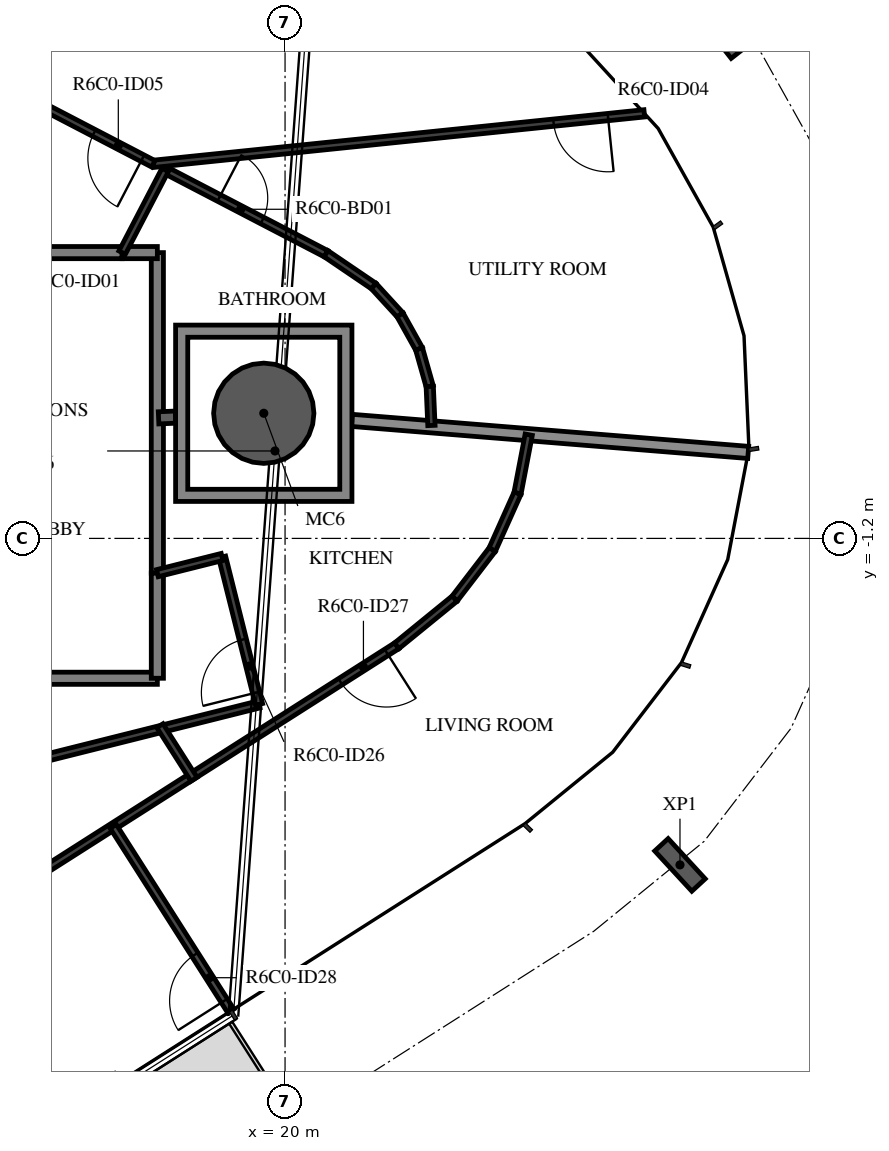
"""IFC4 building model, lengths in metres.
Left out: names, types, materials, properties, quantities, classifications, styles, units other than length and angle.
Written with IfcOpenShell. Run it as: python <this file> out.ifc"""

import sys

from ifc_helpers import new_model, si_unit, direction, frame, frame_2d, origin, origin_2d, place, context, subcontext, project, spatial, polyline, rectangle, hollow_circle, i_section, outline, extrude, element, fill, save


model = new_model("IFC4")
c1 = context("Model", 3, precision=1e-05, world=origin(), true_north=direction((0.0, 1.0)))
c2 = subcontext(c1, "Body", "Model", "MODEL_VIEW")
j1 = project(units=[si_unit("LENGTHUNIT", "METRE"), si_unit("PLANEANGLEUNIT", "RADIAN")], contexts=[c1])
p1 = place(None, origin())
s1 = spatial("IfcSite", under=j1, at=p1, CompositionType="ELEMENT")
p2 = place(p1, origin())
s2 = spatial("IfcBuilding", under=s1, at=p2, CompositionType="ELEMENT")
p3 = place(p2, frame((0.0, 0.0, 247.7)))
s3 = spatial("IfcBuildingStorey", under=s2, at=p3, CompositionType="ELEMENT", Elevation=247.7)
p4 = place(p3, frame((19.65, 0.858, -0.38), z_axis=(0.0, 0.0, 1.0), x_axis=(1.0, 0.0, 0.0)))
e1 = element("IfcColumn", 1, at=p4, inside=s3, PredefinedType="COLUMN", context=c2, shape_type="SweptSolid", body=[
    extrude(hollow_circle(Radius=0.825, WallThickness=0.04, at=origin_2d()), origin(), (0.0, 0.0, 1.0), 3.5),
])
for number, where, z_axis, x_axis in (
    (2, (26.495, -6.569, -0.38), (0.0, 0.0, 1.0), (-0.735, -0.678, 0.0)),
    (3, (27.598, 7.09, -0.38), (0.0, 0.0, 1.0), (0.617, -0.787, 0.0)),
):
    element("IfcColumn", number, at=place(p3, frame(where, z_axis=z_axis, x_axis=x_axis)), inside=s3, PredefinedType="COLUMN", context=c2, shape_type="SweptSolid", body=[
        extrude(i_section(OverallWidth=0.3, OverallDepth=0.9, WebThickness=0.019, FlangeThickness=0.035, FilletRadius=0.03, at=origin_2d()), origin(), (0.0, 0.0, 1.0), 3.5),
    ])
p5 = place(p3, frame((17.321, 3.5, 0.0), z_axis=(0.0, 0.0, 1.0), x_axis=(-1.0, 0.0, 0.0)))
e4 = element("IfcWall", 4, at=p5, inside=s3, PredefinedType="STANDARD", context=c2, shape_type="SweptSolid", body=[
    extrude(rectangle(XDim=4.061, YDim=0.2, at=frame_2d((2.03, 0.0))), origin(), (0.0, 0.0, 1.0), 3.12),
])
p6 = place(p3, frame((17.9, -1.772, 0.0), z_axis=(0.0, 0.0, 1.0), x_axis=(0.0, 1.0, 0.0)))
e5 = element("IfcWall", 5, at=p6, inside=s3, PredefinedType="STANDARD", context=c2, shape_type="SweptSolid", body=[
    extrude(rectangle(XDim=5.272, YDim=0.2, at=frame_2d((2.636, 0.0))), origin(), (0.0, 0.0, 1.0), 3.12),
])
p7 = place(p3, frame((17.9, 3.5, 0.0), z_axis=(0.0, 0.0, 1.0), x_axis=(-1.0, 0.0, 0.0)))
e6 = element("IfcWall", 6, at=p7, inside=s3, PredefinedType="STANDARD", context=c2, shape_type="SweptSolid", body=[
    extrude(rectangle(XDim=0.579, YDim=0.2, at=frame_2d((0.29, 0.0))), origin(), (0.0, 0.0, 1.0), 3.12),
])
p8 = place(p3, frame((13.285, -3.5, 0.0), z_axis=(0.0, 0.0, 1.0), x_axis=(1.0, 0.0, 0.0)))
e7 = element("IfcWall", 7, at=p8, inside=s3, PredefinedType="STANDARD", context=c2, shape_type="SweptSolid", body=[
    extrude(rectangle(XDim=4.615, YDim=0.2, at=frame_2d((2.308, 0.0))), origin(), (0.0, 0.0, 1.0), 3.12),
])
p9 = place(p3, frame((17.9, -3.5, 0.0), z_axis=(0.0, 0.0, 1.0), x_axis=(0.0, 1.0, 0.0)))
e8 = element("IfcWall", 8, at=p9, inside=s3, PredefinedType="STANDARD", context=c2, shape_type="SweptSolid", body=[
    extrude(rectangle(XDim=1.728, YDim=0.2, at=frame_2d((0.864, 0.0))), origin(), (0.0, 0.0, 1.0), 3.12),
])
p10 = place(p3, frame((21.1, 0.741, 0.0), z_axis=(0.0, 0.0, 1.0), x_axis=(0.996750718609, -0.080548153006, 0.0)))
e9 = element("IfcWall", 9, at=p10, inside=s3, PredefinedType="STANDARD", context=c2, shape_type="SweptSolid", body=[
    extrude(rectangle(XDim=6.538, YDim=0.2, at=frame_2d((3.269, 0.0))), origin(), (0.0, 0.0, 1.0), 2.73),
])
p11 = place(p3, frame((17.92, 0.782, 0.0), z_axis=(0.0, 0.0, 1.0), x_axis=(0.999051221661, 0.04355061995, 0.0)))
e10 = element("IfcWall", 10, at=p11, inside=s3, PredefinedType="STANDARD", context=c2, shape_type="SweptSolid", body=[
    extrude(rectangle(XDim=0.28, YDim=0.2, at=frame_2d((0.14, 0.0))), origin(), (0.0, 0.0, 1.0), 3.12),
])
p12 = place(p3, frame((18.028, 4.859, 0.0), z_axis=(0.0, 0.0, 1.0), x_axis=(0.88702512027, -0.46172116695, 0.0)))
e11 = element("IfcWall", 11, at=p12, inside=s3, PredefinedType="PARTITIONING", context=c2, shape_type="SweptSolid", body=[
    extrude(rectangle(XDim=2.983, YDim=0.12, at=frame_2d((1.492, 0.0))), origin(), (0.0, 0.0, 1.0), 3.12),
])
p13 = place(p12, frame((1.0, 0.0, 0.0)))
e12 = element("IfcOpeningElement", 12, at=p13, cuts=e11, PredefinedType="OPENING", context=c2, shape_type="SweptSolid", body=[
    extrude(rectangle(XDim=0.8, YDim=2.1, at=frame_2d((0.4, 1.05))), frame((0.0, 0.07, 0.0), z_axis=(0.0, -1.0, 0.0), x_axis=(1.0, 0.0, 0.0)), (0.0, 0.0, 1.0), 0.14),
])
p14 = place(p3, frame((20.674, 3.481, 0.0), z_axis=(0.0, 0.0, 1.0), x_axis=(0.827420148173, -0.56158338508, 0.0)))
e13 = element("IfcWall", 13, at=p14, inside=s3, PredefinedType="PARTITIONING", context=c2, shape_type="SweptSolid", body=[
    extrude(rectangle(XDim=0.947, YDim=0.12, at=frame_2d((0.473, 0.0))), origin(), (0.0, 0.0, 1.0), 3.12),
])
for number, where, z_axis, x_axis in (
    (14, (21.458, 2.95, 0.0), (0.0, 0.0, 1.0), (0.676, -0.737, 0.0)),
    (15, (21.891, 2.477, 0.0), (0.0, 0.0, 1.0), (0.487, -0.873, 0.0)),
):
    element("IfcWall", number, at=place(p3, frame(where, z_axis=z_axis, x_axis=x_axis)), inside=s3, PredefinedType="PARTITIONING", context=c2, shape_type="SweptSolid", body=[
        extrude(rectangle(XDim=0.642, YDim=0.12, at=frame_2d((0.321, 0.0))), origin(), (0.0, 0.0, 1.0), 3.12),
    ])
p15 = place(p3, frame((22.204, 1.916, 0.0), z_axis=(0.0, 0.0, 1.0), x_axis=(0.273013196411, -0.962010288191, 0.0)))
e16 = element("IfcWall", 16, at=p15, inside=s3, PredefinedType="PARTITIONING", context=c2, shape_type="SweptSolid", body=[
    extrude(rectangle(XDim=0.642, YDim=0.12, at=frame_2d((0.321, 0.0))), origin(), (0.0, 0.0, 1.0), 3.12),
])
p16 = place(p3, frame((22.379, 1.298, 0.0), z_axis=(0.0, 0.0, 1.0), x_axis=(0.043354705242, -0.999059742725, 0.0)))
e17 = element("IfcWall", 17, at=p16, inside=s3, PredefinedType="PARTITIONING", context=c2, shape_type="SweptSolid", body=[
    extrude(rectangle(XDim=0.642, YDim=0.12, at=frame_2d((0.321, 0.0))), origin(), (0.0, 0.0, 1.0), 3.12),
])
p17 = place(p3, frame((25.908, 5.79, 0.0), z_axis=(0.0, 0.0, 1.0), x_axis=(-0.994752982456, -0.102305932847, 0.0)))
e18 = element("IfcWall", 18, at=p17, inside=s3, PredefinedType="PARTITIONING", context=c2, shape_type="SweptSolid", body=[
    extrude(rectangle(XDim=8.116, YDim=0.12, at=frame_2d((4.058, 0.0))), origin(), (0.0, 0.0, 1.0), 3.12),
])
p18 = place(p17, frame((0.6, 0.0, 0.0)))
e19 = element("IfcOpeningElement", 19, at=p18, cuts=e18, PredefinedType="OPENING", context=c2, shape_type="SweptSolid", body=[
    extrude(rectangle(XDim=0.9, YDim=2.1, at=frame_2d((0.45, 1.05))), frame((0.0, 0.07, 0.0), z_axis=(0.0, -1.0, 0.0), x_axis=(1.0, 0.0, 0.0)), (0.0, 0.0, 1.0), 0.14),
])
p19 = place(p3, frame((18.028, 4.859, 0.0), z_axis=(0.0, 0.0, 1.0), x_axis=(-0.461688901614, -0.887041914526, 0.0)))
e20 = element("IfcWall", 20, at=p19, inside=s3, PredefinedType="PARTITIONING", context=c2, shape_type="SweptSolid", body=[
    extrude(rectangle(XDim=1.532, YDim=0.12, at=frame_2d((0.766, 0.0))), origin(), (0.0, 0.0, 1.0), 3.12),
])
p20 = place(p3, frame((17.834, 4.96, 0.0), z_axis=(0.0, 0.0, 1.0), x_axis=(-0.887008743782, 0.461752626906, 0.0)))
e21 = element("IfcWall", 21, at=p20, inside=s3, PredefinedType="PARTITIONING", context=c2, shape_type="SweptSolid", body=[
    extrude(rectangle(XDim=5.612, YDim=0.12, at=frame_2d((2.806, 0.0))), origin(), (0.0, 0.0, 1.0), 3.12),
])
p21 = place(p20, frame((0.2, 0.0, 0.0)))
e22 = element("IfcOpeningElement", 22, at=p21, cuts=e21, PredefinedType="OPENING", context=c2, shape_type="SweptSolid", body=[
    extrude(rectangle(XDim=0.9, YDim=2.1, at=frame_2d((0.45, 1.05))), frame((0.0, 0.07, 0.0), z_axis=(0.0, -1.0, 0.0), x_axis=(1.0, 0.0, 0.0)), (0.0, 0.0, 1.0), 0.14),
])
p22 = place(p3, frame((14.029, -5.32, 0.0), z_axis=(0.0, 0.0, 1.0), x_axis=(0.969999099814, 0.243108507378, 0.0)))
e23 = element("IfcWall", 23, at=p22, inside=s3, PredefinedType="PARTITIONING", context=c2, shape_type="SweptSolid", body=[
    extrude(rectangle(XDim=5.715, YDim=0.12, at=frame_2d((2.857, 0.0))), origin(), (0.0, 0.0, 1.0), 3.12),
])
p23 = place(p3, frame((19.573, -3.93, 0.0), z_axis=(0.0, 0.0, 1.0), x_axis=(-0.243155959183, 0.96998720585, 0.0)))
e24 = element("IfcWall", 24, at=p23, inside=s3, PredefinedType="PARTITIONING", context=c2, shape_type="SweptSolid", body=[
    extrude(rectangle(XDim=2.5, YDim=0.12, at=frame_2d((1.25, 0.0))), origin(), (0.0, 0.0, 1.0), 3.12),
])
p24 = place(p23, frame((0.2, 0.0, 0.0)))
e25 = element("IfcOpeningElement", 25, at=p24, cuts=e24, PredefinedType="OPENING", context=c2, shape_type="SweptSolid", body=[
    extrude(rectangle(XDim=0.9, YDim=2.1, at=frame_2d((0.45, 1.05))), frame((0.0, 0.07, 0.0), z_axis=(0.0, -1.0, 0.0), x_axis=(1.0, 0.0, 0.0)), (0.0, 0.0, 1.0), 0.14),
])
p25 = place(p3, frame((18.965, -1.505, 0.0), z_axis=(0.0, 0.0, 1.0), x_axis=(-0.969998406835, -0.243111272339, 0.0)))
e26 = element("IfcWall", 26, at=p25, inside=s3, PredefinedType="PARTITIONING", context=c2, shape_type="SweptSolid", body=[
    extrude(rectangle(XDim=1.098, YDim=0.12, at=frame_2d((0.549, 0.0))), origin(), (0.0, 0.0, 1.0), 3.12),
])
p26 = place(p3, frame((21.837, -2.966, 0.0), z_axis=(0.0, 0.0, 1.0), x_axis=(-0.843394529709, -0.537294767569, 0.0)))
e27 = element("IfcWall", 27, at=p26, inside=s3, PredefinedType="PARTITIONING", context=c2, shape_type="SweptSolid", body=[
    extrude(rectangle(XDim=11.678, YDim=0.12, at=frame_2d((5.839, 0.0))), origin(), (0.0, 0.0, 1.0), 3.12),
])
p27 = place(p26, frame((0.2, 0.0, 0.0)))
e28 = element("IfcOpeningElement", 28, at=p27, cuts=e27, PredefinedType="OPENING", context=c2, shape_type="SweptSolid", body=[
    extrude(rectangle(XDim=0.9, YDim=2.1, at=frame_2d((0.45, 1.05))), frame((0.0, 0.07, 0.0), z_axis=(0.0, -1.0, 0.0), x_axis=(1.0, 0.0, 0.0)), (0.0, 0.0, 1.0), 0.14),
])
p28 = place(p3, frame((19.109, -8.972, 0.0), z_axis=(0.0, 0.0, 1.0), x_axis=(-0.537318625891, 0.843379329999, 0.0)))
e29 = element("IfcWall", 29, at=p28, inside=s3, PredefinedType="PARTITIONING", context=c2, shape_type="SweptSolid", body=[
    extrude(rectangle(XDim=3.6, YDim=0.12, at=frame_2d((1.8, 0.0))), origin(), (0.0, 0.0, 1.0), 2.73),
])
p29 = place(p28, frame((0.2, 0.0, 0.0)))
e30 = element("IfcOpeningElement", 30, at=p29, cuts=e29, PredefinedType="OPENING", context=c2, shape_type="SweptSolid", body=[
    extrude(rectangle(XDim=0.9, YDim=2.1, at=frame_2d((0.45, 1.05))), frame((0.0, 0.07, 0.0), z_axis=(0.0, -1.0, 0.0), x_axis=(1.0, 0.0, 0.0)), (0.0, 0.0, 1.0), 0.14),
])
p30 = place(p3, frame((18.503, -5.161, 0.0), z_axis=(0.0, 0.0, 1.0), x_axis=(-0.537208231854, 0.843449652101, 0.0)))
e31 = element("IfcWall", 31, at=p30, inside=s3, PredefinedType="PARTITIONING", context=c2, shape_type="SweptSolid", body=[
    extrude(rectangle(XDim=1.044, YDim=0.12, at=frame_2d((0.522, 0.0))), origin(), (0.0, 0.0, 1.0), 3.12),
])
p31 = place(p3, frame((24.007, 0.506, 0.0), z_axis=(0.0, 0.0, 1.0), x_axis=(-0.187878189528, -0.98219233651, 0.0)))
e32 = element("IfcWall", 32, at=p31, inside=s3, PredefinedType="PARTITIONING", context=c2, shape_type="SweptSolid", body=[
    extrude(rectangle(XDim=0.981, YDim=0.12, at=frame_2d((0.491, 0.0))), origin(), (0.0, 0.0, 1.0), 3.12),
])
p32 = place(p3, frame((23.823, -0.458, 0.0), z_axis=(0.0, 0.0, 1.0), x_axis=(-0.409435319137, -0.912339147161, 0.0)))
e33 = element("IfcWall", 33, at=p32, inside=s3, PredefinedType="PARTITIONING", context=c2, shape_type="SweptSolid", body=[
    extrude(rectangle(XDim=1.016, YDim=0.12, at=frame_2d((0.508, 0.0))), origin(), (0.0, 0.0, 1.0), 3.12),
])
p33 = place(p3, frame((23.407, -1.385, 0.0), z_axis=(0.0, 0.0, 1.0), x_axis=(-0.608769538934, -0.793347117261, 0.0)))
e34 = element("IfcWall", 34, at=p33, inside=s3, PredefinedType="PARTITIONING", context=c2, shape_type="SweptSolid", body=[
    extrude(rectangle(XDim=1.016, YDim=0.12, at=frame_2d((0.508, 0.0))), origin(), (0.0, 0.0, 1.0), 3.12),
])
p34 = place(p3, frame((22.789, -2.191, 0.0), z_axis=(0.0, 0.0, 1.0), x_axis=(-0.775267457727, -0.631633096813, 0.0)))
e35 = element("IfcWall", 35, at=p34, inside=s3, PredefinedType="PARTITIONING", context=c2, shape_type="SweptSolid", body=[
    extrude(rectangle(XDim=1.227, YDim=0.12, at=frame_2d((0.614, 0.0))), origin(), (0.0, 0.0, 1.0), 3.12),
])
p35 = place(p3, origin())
e36 = element("IfcWall", 36, at=p35, inside=s3, PredefinedType="STANDARD", context=c2, shape_type="SweptSolid", body=[
    extrude(outline(polyline([(21.1, 2.308), (21.1, -0.592), (18.2, -0.592), (18.2, 2.308), (21.1, 2.308)]), holes=[polyline([(18.4, -0.392), (20.9, -0.392), (20.9, 2.108), (18.4, 2.108), (18.4, -0.392)])]), origin(), (0.0, 0.0, 1.0), 3.12),
])
p36 = place(p18, origin())
e37 = element("IfcDoor", 37, at=p36, inside=s3, OperationType="SINGLE_SWING_LEFT", PredefinedType="DOOR", context=c2, shape_type="SweptSolid", body=[
    extrude(rectangle(XDim=0.9, YDim=2.1, at=frame_2d((0.45, 1.05))), frame((0.0, 0.025, 0.0), z_axis=(0.0, -1.0, 0.0), x_axis=(1.0, 0.0, 0.0)), (0.0, 0.0, 1.0), 0.05),
])
fill(e19, e37)
p37 = place(p13, origin())
e38 = element("IfcDoor", 38, at=p37, inside=s3, OperationType="SINGLE_SWING_RIGHT", PredefinedType="DOOR", context=c2, shape_type="SweptSolid", body=[
    extrude(rectangle(XDim=0.8, YDim=2.1, at=frame_2d((0.4, 1.05))), frame((0.0, 0.025, 0.0), z_axis=(0.0, -1.0, 0.0), x_axis=(1.0, 0.0, 0.0)), (0.0, 0.0, 1.0), 0.05),
])
fill(e12, e38)
p38 = place(p21, origin())
e39 = element("IfcDoor", 39, at=p38, inside=s3, OperationType="SINGLE_SWING_RIGHT", PredefinedType="DOOR", context=c2, shape_type="SweptSolid", body=[
    extrude(rectangle(XDim=0.9, YDim=2.1, at=frame_2d((0.45, 1.05))), frame((0.0, 0.025, 0.0), z_axis=(0.0, -1.0, 0.0), x_axis=(1.0, 0.0, 0.0)), (0.0, 0.0, 1.0), 0.05),
])
fill(e22, e39)
p39 = place(p24, origin())
e40 = element("IfcDoor", 40, at=p39, inside=s3, OperationType="SINGLE_SWING_RIGHT", PredefinedType="DOOR", context=c2, shape_type="SweptSolid", body=[
    extrude(rectangle(XDim=0.9, YDim=2.1, at=frame_2d((0.45, 1.05))), frame((0.0, 0.025, 0.0), z_axis=(0.0, -1.0, 0.0), x_axis=(1.0, 0.0, 0.0)), (0.0, 0.0, 1.0), 0.05),
])
fill(e25, e40)
p40 = place(p27, origin())
e41 = element("IfcDoor", 41, at=p40, inside=s3, OperationType="SINGLE_SWING_RIGHT", PredefinedType="DOOR", context=c2, shape_type="SweptSolid", body=[
    extrude(rectangle(XDim=0.9, YDim=2.1, at=frame_2d((0.45, 1.05))), frame((0.0, 0.025, 0.0), z_axis=(0.0, -1.0, 0.0), x_axis=(1.0, 0.0, 0.0)), (0.0, 0.0, 1.0), 0.05),
])
fill(e28, e41)
p41 = place(p29, origin())
e42 = element("IfcDoor", 42, at=p41, inside=s3, OperationType="SINGLE_SWING_LEFT", PredefinedType="DOOR", context=c2, shape_type="SweptSolid", body=[
    extrude(rectangle(XDim=0.9, YDim=2.1, at=frame_2d((0.45, 1.05))), frame((0.0, 0.025, 0.0), z_axis=(0.0, -1.0, 0.0), x_axis=(1.0, 0.0, 0.0)), (0.0, 0.0, 1.0), 0.05),
])
fill(e30, e42)
save(model, sys.argv[1])
